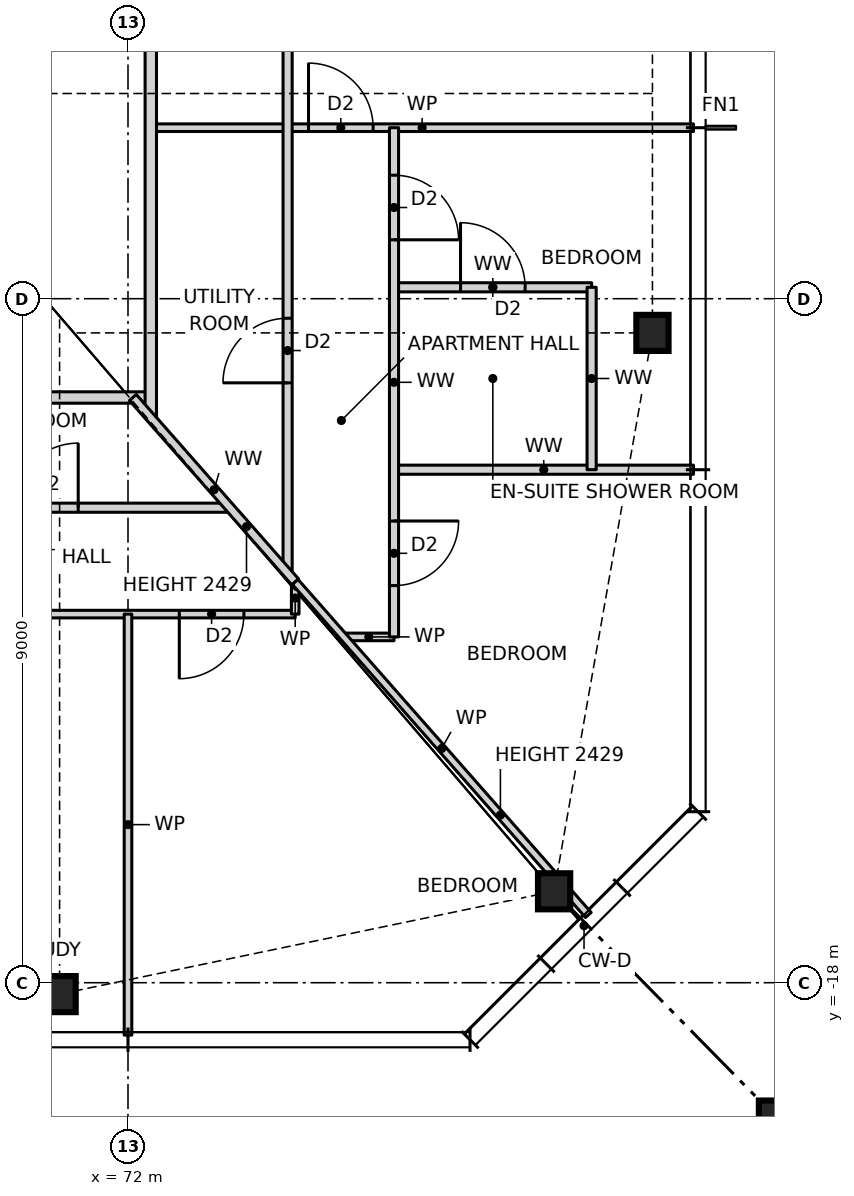
"""IFC4 building model, lengths in metres.
Left out: names, types, materials, properties, quantities, classifications, styles, units other than length and angle.
Written with IfcOpenShell. Run it as: python <this file> out.ifc"""

import sys

from ifc_helpers import new_model, si_unit, direction, frame, frame_2d, origin, origin_2d, place, context, subcontext, project, spatial, rectangle, hollow_rectangle, i_section, extrude, element, fill, save


model = new_model("IFC4")
c1 = context("Model", 3, precision=1e-05, world=origin(), true_north=direction((0.0, 1.0)))
c2 = subcontext(c1, "Body", "Model", "MODEL_VIEW")
j1 = project(units=[si_unit("LENGTHUNIT", "METRE"), si_unit("PLANEANGLEUNIT", "RADIAN")], contexts=[c1])
p1 = place(None, origin())
s1 = spatial("IfcSite", under=j1, at=p1, CompositionType="ELEMENT")
p2 = place(p1, origin())
s2 = spatial("IfcBuilding", under=s1, at=p2, CompositionType="ELEMENT")
p3 = place(p2, frame((0.0, 0.0, 29.0)))
s3 = spatial("IfcBuildingStorey", under=s2, at=p3, CompositionType="ELEMENT", Elevation=29.0)
for number, where, z_axis, x_axis in (
    (1, (71.1, -18.15, 0.0), (0.0, 0.0, 1.0), (1.0, 0.0, 0.0)),
    (2, (77.606, -16.797, 0.0), (0.0, 0.0, 1.0), (1.0, 0.0, 0.0)),
    (3, (78.9, -9.45, 0.0), (0.0, 0.0, 1.0), (1.0, 0.0, 0.0)),
):
    element("IfcColumn", number, at=place(p3, frame(where, z_axis=z_axis, x_axis=x_axis)), inside=s3, PredefinedType="COLUMN", context=c2, shape_type="SweptSolid", body=[
        extrude(i_section(OverallWidth=0.424, OverallDepth=0.475, WebThickness=0.048, FlangeThickness=0.077, at=origin_2d()), origin(), (0.0, 0.0, 1.0), 3.5),
    ])
p4 = place(p3, frame((80.9, -20.15, 0.0), z_axis=(0.0, 0.0, 1.0), x_axis=(1.0, 0.0, 0.0)))
e4 = element("IfcColumn", 4, at=p4, inside=s3, PredefinedType="COLUMN", context=c2, shape_type="SweptSolid", body=[
    extrude(hollow_rectangle(XDim=1.2, YDim=1.2, WallThickness=0.07, at=origin_2d()), origin(), (0.0, 0.0, 1.0), 3.5),
])
p5 = place(p3, frame((74.836, -13.45, 0.0), z_axis=(0.0, 0.0, 1.0), x_axis=(1.0, 0.0, 0.0)))
e5 = element("IfcWall", 5, at=p5, inside=s3, PredefinedType="PARTITIONING", context=c2, shape_type="SweptSolid", body=[
    extrude(rectangle(XDim=0.664, YDim=0.1, at=frame_2d((0.332, 0.0))), origin(), (0.0, 0.0, 1.0), 3.27),
])
p6 = place(p3, frame((63.0, -13.15, 0.0), z_axis=(0.0, 0.0, 1.0), x_axis=(1.0, 0.0, 0.0)))
e6 = element("IfcWall", 6, at=p6, inside=s3, PredefinedType="PARTITIONING", context=c2, shape_type="SweptSolid", body=[
    extrude(rectangle(XDim=11.2, YDim=0.1, at=frame_2d((5.6, 0.0))), origin(), (0.0, 0.0, 1.0), 3.27),
])
p7 = place(p6, frame((1.825, 0.0, 0.0)))
e7 = element("IfcOpeningElement", 7, at=p7, cuts=e6, PredefinedType="OPENING", context=c2, shape_type="SweptSolid", body=[
    extrude(rectangle(XDim=0.85, YDim=2.1, at=frame_2d((0.425, 1.05))), frame((0.0, 0.06, 0.0), z_axis=(0.0, -1.0, 0.0), x_axis=(1.0, 0.0, 0.0)), (0.0, 0.0, 1.0), 0.12),
])
p8 = place(p6, frame((6.325, 0.0, 0.0)))
e8 = element("IfcOpeningElement", 8, at=p8, cuts=e6, PredefinedType="OPENING", context=c2, shape_type="SweptSolid", body=[
    extrude(rectangle(XDim=0.85, YDim=2.1, at=frame_2d((0.425, 1.05))), frame((0.0, 0.06, 0.0), z_axis=(0.0, -1.0, 0.0), x_axis=(1.0, 0.0, 0.0)), (0.0, 0.0, 1.0), 0.12),
])
p9 = place(p6, frame((9.675, 0.0, 0.0)))
e9 = element("IfcOpeningElement", 9, at=p9, cuts=e6, PredefinedType="OPENING", context=c2, shape_type="SweptSolid", body=[
    extrude(rectangle(XDim=0.85, YDim=2.1, at=frame_2d((0.425, 1.05))), frame((0.0, 0.06, 0.0), z_axis=(0.0, -1.0, 0.0), x_axis=(1.0, 0.0, 0.0)), (0.0, 0.0, 1.0), 0.12),
])
p10 = place(p3, frame((54.0, -11.75, 0.0), z_axis=(0.0, 0.0, 1.0), x_axis=(1.0, 0.0, 0.0)))
e10 = element("IfcWall", 10, at=p10, inside=s3, PredefinedType="PARTITIONING", context=c2, shape_type="SweptSolid", body=[
    extrude(rectangle(XDim=19.34, YDim=0.12, at=frame_2d((9.67, 0.0))), origin(), (0.0, 0.0, 1.0), 3.27),
])
p11 = place(p10, frame((1.375, 0.0, 0.0)))
e11 = element("IfcOpeningElement", 11, at=p11, cuts=e10, PredefinedType="OPENING", context=c2, shape_type="SweptSolid", body=[
    extrude(rectangle(XDim=0.85, YDim=2.1, at=frame_2d((0.425, 1.05))), frame((0.0, 0.07, 0.0), z_axis=(0.0, -1.0, 0.0), x_axis=(1.0, 0.0, 0.0)), (0.0, 0.0, 1.0), 0.14),
])
p12 = place(p10, frame((4.575, 0.0, 0.0)))
e12 = element("IfcOpeningElement", 12, at=p12, cuts=e10, PredefinedType="OPENING", context=c2, shape_type="SweptSolid", body=[
    extrude(rectangle(XDim=0.85, YDim=2.1, at=frame_2d((0.425, 1.05))), frame((0.0, 0.07, 0.0), z_axis=(0.0, -1.0, 0.0), x_axis=(1.0, 0.0, 0.0)), (0.0, 0.0, 1.0), 0.14),
])
p13 = place(p10, frame((11.325, 0.0, 0.0)))
e13 = element("IfcOpeningElement", 13, at=p13, cuts=e10, PredefinedType="OPENING", context=c2, shape_type="SweptSolid", body=[
    extrude(rectangle(XDim=0.85, YDim=2.1, at=frame_2d((0.425, 1.05))), frame((0.0, 0.07, 0.0), z_axis=(0.0, -1.0, 0.0), x_axis=(1.0, 0.0, 0.0)), (0.0, 0.0, 1.0), 0.14),
])
p14 = place(p10, frame((16.495, 0.0, 0.0)))
e14 = element("IfcOpeningElement", 14, at=p14, cuts=e10, PredefinedType="OPENING", context=c2, shape_type="SweptSolid", body=[
    extrude(rectangle(XDim=0.85, YDim=2.1, at=frame_2d((0.425, 1.05))), frame((0.0, 0.07, 0.0), z_axis=(0.0, -1.0, 0.0), x_axis=(1.0, 0.0, 0.0)), (0.0, 0.0, 1.0), 0.14),
])
p15 = place(p3, frame((75.5, -11.25, 0.0), z_axis=(0.0, 0.0, 1.0), x_axis=(1.0, 0.0, 0.0)))
e15 = element("IfcWall", 15, at=p15, inside=s3, PredefinedType="PARTITIONING", context=c2, shape_type="SweptSolid", body=[
    extrude(rectangle(XDim=3.94, YDim=0.12, at=frame_2d((1.97, 0.0))), origin(), (0.0, 0.0, 1.0), 3.27),
])
p16 = place(p3, frame((53.7, -10.3, 0.0), z_axis=(0.0, 0.0, 1.0), x_axis=(1.0, 0.0, 0.0)))
e16 = element("IfcWall", 16, at=p16, inside=s3, PredefinedType="PARTITIONING", context=c2, shape_type="SweptSolid", body=[
    extrude(rectangle(XDim=18.6, YDim=0.15, at=frame_2d((9.3, 0.0))), origin(), (0.0, 0.0, 1.0), 3.27),
])
p17 = place(p16, frame((4.8, 0.0, 0.0)))
e17 = element("IfcOpeningElement", 17, at=p17, cuts=e16, PredefinedType="OPENING", context=c2, shape_type="SweptSolid", body=[
    extrude(rectangle(XDim=1.0, YDim=2.1, at=frame_2d((0.5, 1.05))), frame((0.0, 0.085, 0.0), z_axis=(0.0, -1.0, 0.0), x_axis=(1.0, 0.0, 0.0)), (0.0, 0.0, 1.0), 0.17),
])
p18 = place(p3, frame((75.5, -8.85, 0.0), z_axis=(0.0, 0.0, 1.0), x_axis=(1.0, 0.0, 0.0)))
e18 = element("IfcWall", 18, at=p18, inside=s3, PredefinedType="PARTITIONING", context=c2, shape_type="SweptSolid", body=[
    extrude(rectangle(XDim=2.6, YDim=0.12, at=frame_2d((1.3, 0.0))), origin(), (0.0, 0.0, 1.0), 3.27),
])
p19 = place(p18, frame((0.875, 0.0, 0.0)))
e19 = element("IfcOpeningElement", 19, at=p19, cuts=e18, PredefinedType="OPENING", context=c2, shape_type="SweptSolid", body=[
    extrude(rectangle(XDim=0.85, YDim=2.1, at=frame_2d((0.425, 1.05))), frame((0.0, 0.07, 0.0), z_axis=(0.0, -1.0, 0.0), x_axis=(1.0, 0.0, 0.0)), (0.0, 0.0, 1.0), 0.14),
])
p20 = place(p3, frame((72.3, -6.75, 0.0), z_axis=(0.0, 0.0, 1.0), x_axis=(1.0, 0.0, 0.0)))
e20 = element("IfcWall", 20, at=p20, inside=s3, PredefinedType="PARTITIONING", context=c2, shape_type="SweptSolid", body=[
    extrude(rectangle(XDim=7.14, YDim=0.1, at=frame_2d((3.57, 0.0))), origin(), (0.0, 0.0, 1.0), 3.27),
])
p21 = place(p20, frame((2.075, 0.0, 0.0)))
e21 = element("IfcOpeningElement", 21, at=p21, cuts=e20, PredefinedType="OPENING", context=c2, shape_type="SweptSolid", body=[
    extrude(rectangle(XDim=0.85, YDim=2.1, at=frame_2d((0.425, 1.05))), frame((0.0, 0.06, 0.0), z_axis=(0.0, -1.0, 0.0), x_axis=(1.0, 0.0, 0.0)), (0.0, 0.0, 1.0), 0.12),
])
p22 = place(p3, frame((78.1, -11.25, 0.0), z_axis=(0.0, 0.0, 1.0), x_axis=(0.0, 1.0, 0.0)))
e22 = element("IfcWall", 22, at=p22, inside=s3, PredefinedType="PARTITIONING", context=c2, shape_type="SweptSolid", body=[
    extrude(rectangle(XDim=2.4, YDim=0.12, at=frame_2d((1.2, 0.0))), origin(), (0.0, 0.0, 1.0), 3.27),
])
p23 = place(p3, frame((75.5, -13.45, 0.0), z_axis=(0.0, 0.0, 1.0), x_axis=(0.0, 1.0, 0.0)))
e23 = element("IfcWall", 23, at=p23, inside=s3, PredefinedType="PARTITIONING", context=c2, shape_type="SweptSolid", body=[
    extrude(rectangle(XDim=6.7, YDim=0.12, at=frame_2d((3.35, 0.0))), origin(), (0.0, 0.0, 1.0), 3.27),
])
p24 = place(p23, frame((5.225, 0.0, 0.0)))
e24 = element("IfcOpeningElement", 24, at=p24, cuts=e23, PredefinedType="OPENING", context=c2, shape_type="SweptSolid", body=[
    extrude(rectangle(XDim=0.85, YDim=2.1, at=frame_2d((0.425, 1.05))), frame((0.0, 0.07, 0.0), z_axis=(0.0, -1.0, 0.0), x_axis=(1.0, 0.0, 0.0)), (0.0, 0.0, 1.0), 0.14),
])
p25 = place(p23, frame((0.675, 0.0, 0.0)))
e25 = element("IfcOpeningElement", 25, at=p25, cuts=e23, PredefinedType="OPENING", context=c2, shape_type="SweptSolid", body=[
    extrude(rectangle(XDim=0.85, YDim=2.1, at=frame_2d((0.425, 1.05))), frame((0.0, 0.07, 0.0), z_axis=(0.0, -1.0, 0.0), x_axis=(1.0, 0.0, 0.0)), (0.0, 0.0, 1.0), 0.14),
])
p26 = place(p3, frame((74.2, -13.15, 0.0), z_axis=(0.0, 0.0, 1.0), x_axis=(0.0, 1.0, 0.0)))
e26 = element("IfcWall", 26, at=p26, inside=s3, PredefinedType="PARTITIONING", context=c2, shape_type="SweptSolid", body=[
    extrude(rectangle(XDim=0.423, YDim=0.1, at=frame_2d((0.211, 0.0))), origin(), (0.0, 0.0, 1.0), 3.27),
])
p27 = place(p3, frame((74.1, -12.614, 0.0), z_axis=(0.0, 0.0, 1.0), x_axis=(0.0, 1.0, 0.0)))
e27 = element("IfcWall", 27, at=p27, inside=s3, PredefinedType="PARTITIONING", context=c2, shape_type="SweptSolid", body=[
    extrude(rectangle(XDim=25.228, YDim=0.12, at=frame_2d((12.614, 0.0))), origin(), (0.0, 0.0, 1.0), 3.27),
])
p28 = place(p27, frame((7.239, 0.0, 0.0)))
e28 = element("IfcOpeningElement", 28, at=p28, cuts=e27, PredefinedType="OPENING", context=c2, shape_type="SweptSolid", body=[
    extrude(rectangle(XDim=0.85, YDim=2.1, at=frame_2d((0.425, 1.05))), frame((0.0, 0.07, 0.0), z_axis=(0.0, -1.0, 0.0), x_axis=(1.0, 0.0, 0.0)), (0.0, 0.0, 1.0), 0.14),
])
p29 = place(p27, frame((10.439, 0.0, 0.0)))
e29 = element("IfcOpeningElement", 29, at=p29, cuts=e27, PredefinedType="OPENING", context=c2, shape_type="SweptSolid", body=[
    extrude(rectangle(XDim=0.85, YDim=2.1, at=frame_2d((0.425, 1.05))), frame((0.0, 0.07, 0.0), z_axis=(0.0, -1.0, 0.0), x_axis=(1.0, 0.0, 0.0)), (0.0, 0.0, 1.0), 0.14),
])
p30 = place(p27, frame((2.507, 0.0, 0.0)))
e30 = element("IfcOpeningElement", 30, at=p30, cuts=e27, PredefinedType="OPENING", context=c2, shape_type="SweptSolid", body=[
    extrude(rectangle(XDim=0.85, YDim=2.1, at=frame_2d((0.425, 1.05))), frame((0.0, 0.07, 0.0), z_axis=(0.0, -1.0, 0.0), x_axis=(1.0, 0.0, 0.0)), (0.0, 0.0, 1.0), 0.14),
])
p31 = place(p27, frame((16.639, 0.0, 0.0)))
e31 = element("IfcOpeningElement", 31, at=p31, cuts=e27, PredefinedType="OPENING", context=c2, shape_type="SweptSolid", body=[
    extrude(rectangle(XDim=0.85, YDim=2.1, at=frame_2d((0.425, 1.05))), frame((0.0, 0.07, 0.0), z_axis=(0.0, -1.0, 0.0), x_axis=(1.0, 0.0, 0.0)), (0.0, 0.0, 1.0), 0.14),
])
p32 = place(p27, frame((21.821, 0.0, 0.0)))
e32 = element("IfcOpeningElement", 32, at=p32, cuts=e27, PredefinedType="OPENING", context=c2, shape_type="SweptSolid", body=[
    extrude(rectangle(XDim=0.85, YDim=2.1, at=frame_2d((0.425, 1.05))), frame((0.0, 0.07, 0.0), z_axis=(0.0, -1.0, 0.0), x_axis=(1.0, 0.0, 0.0)), (0.0, 0.0, 1.0), 0.14),
])
p33 = place(p3, frame((72.3, -10.568, 0.0), z_axis=(0.0, 0.0, 1.0), x_axis=(0.0, 1.0, 0.0)))
e33 = element("IfcWall", 33, at=p33, inside=s3, PredefinedType="PARTITIONING", context=c2, shape_type="SweptSolid", body=[
    extrude(rectangle(XDim=21.136, YDim=0.15, at=frame_2d((10.568, 0.0))), origin(), (0.0, 0.0, 1.0), 3.27),
])
p34 = place(p33, frame((8.318, 0.0, 0.0)))
e34 = element("IfcOpeningElement", 34, at=p34, cuts=e33, PredefinedType="OPENING", context=c2, shape_type="SweptSolid", body=[
    extrude(rectangle(XDim=1.0, YDim=2.1, at=frame_2d((0.5, 1.05))), frame((0.0, 0.085, 0.0), z_axis=(0.0, -1.0, 0.0), x_axis=(1.0, 0.0, 0.0)), (0.0, 0.0, 1.0), 0.17),
])
p35 = place(p3, frame((72.0, -18.69, 0.0), z_axis=(0.0, 0.0, 1.0), x_axis=(0.0, 1.0, 0.0)))
e35 = element("IfcWall", 35, at=p35, inside=s3, PredefinedType="PARTITIONING", context=c2, shape_type="SweptSolid", body=[
    extrude(rectangle(XDim=5.54, YDim=0.1, at=frame_2d((2.77, 0.0))), origin(), (0.0, 0.0, 1.0), 3.27),
])
p36 = place(p3, frame((74.2, -12.727, 0.0), z_axis=(0.0, 0.0, 1.0), x_axis=(-0.660667046586, 0.75067906162, 0.0)))
e36 = element("IfcWall", 36, at=p36, inside=s3, PredefinedType="PARTITIONING", context=c2, shape_type="SweptSolid", body=[
    extrude(rectangle(XDim=3.233, YDim=0.12, at=frame_2d((1.617, 0.0))), origin(), (0.0, 0.0, 1.0), 2.429),
])
p37 = place(p3, frame((78.057, -17.109, 0.0), z_axis=(0.0, 0.0, 1.0), x_axis=(-0.660698595885, 0.750651294141, 0.0)))
e37 = element("IfcWall", 37, at=p37, inside=s3, PredefinedType="PARTITIONING", context=c2, shape_type="SweptSolid", body=[
    extrude(rectangle(XDim=5.838, YDim=0.1, at=frame_2d((2.919, 0.0))), origin(), (0.0, 0.0, 1.0), 2.429),
])
p38 = place(p9, frame((0.85, 0.0, 0.0), z_axis=(0.0, 0.0, 1.0), x_axis=(-1.0, 0.0, 0.0)))
e38 = element("IfcDoor", 38, at=p38, inside=s3, OperationType="SINGLE_SWING_RIGHT", PredefinedType="DOOR", context=c2, shape_type="SweptSolid", body=[
    extrude(rectangle(XDim=0.85, YDim=2.1, at=frame_2d((0.425, 1.05))), frame((0.0, 0.025, 0.0), z_axis=(0.0, -1.0, 0.0), x_axis=(1.0, 0.0, 0.0)), (0.0, 0.0, 1.0), 0.05),
])
fill(e9, e38)
p39 = place(p14, origin())
e39 = element("IfcDoor", 39, at=p39, inside=s3, OperationType="SINGLE_SWING_RIGHT", PredefinedType="DOOR", context=c2, shape_type="SweptSolid", body=[
    extrude(rectangle(XDim=0.85, YDim=2.1, at=frame_2d((0.425, 1.05))), frame((0.0, 0.025, 0.0), z_axis=(0.0, -1.0, 0.0), x_axis=(1.0, 0.0, 0.0)), (0.0, 0.0, 1.0), 0.05),
])
fill(e14, e39)
p40 = place(p21, origin())
e40 = element("IfcDoor", 40, at=p40, inside=s3, OperationType="SINGLE_SWING_LEFT", PredefinedType="DOOR", context=c2, shape_type="SweptSolid", body=[
    extrude(rectangle(XDim=0.85, YDim=2.1, at=frame_2d((0.425, 1.05))), frame((0.0, 0.025, 0.0), z_axis=(0.0, -1.0, 0.0), x_axis=(1.0, 0.0, 0.0)), (0.0, 0.0, 1.0), 0.05),
])
fill(e21, e40)
p41 = place(p19, origin())
e41 = element("IfcDoor", 41, at=p41, inside=s3, OperationType="SINGLE_SWING_LEFT", PredefinedType="DOOR", context=c2, shape_type="SweptSolid", body=[
    extrude(rectangle(XDim=0.85, YDim=2.1, at=frame_2d((0.425, 1.05))), frame((0.0, 0.025, 0.0), z_axis=(0.0, -1.0, 0.0), x_axis=(1.0, 0.0, 0.0)), (0.0, 0.0, 1.0), 0.05),
])
fill(e19, e41)
p42 = place(p24, frame((0.85, 0.0, 0.0), z_axis=(0.0, 0.0, 1.0), x_axis=(-1.0, 0.0, 0.0)))
e42 = element("IfcDoor", 42, at=p42, inside=s3, OperationType="SINGLE_SWING_RIGHT", PredefinedType="DOOR", context=c2, shape_type="SweptSolid", body=[
    extrude(rectangle(XDim=0.85, YDim=2.1, at=frame_2d((0.425, 1.05))), frame((0.0, 0.025, 0.0), z_axis=(0.0, -1.0, 0.0), x_axis=(1.0, 0.0, 0.0)), (0.0, 0.0, 1.0), 0.05),
])
fill(e24, e42)
p43 = place(p25, frame((0.85, 0.0, 0.0), z_axis=(0.0, 0.0, 1.0), x_axis=(-1.0, 0.0, 0.0)))
e43 = element("IfcDoor", 43, at=p43, inside=s3, OperationType="SINGLE_SWING_LEFT", PredefinedType="DOOR", context=c2, shape_type="SweptSolid", body=[
    extrude(rectangle(XDim=0.85, YDim=2.1, at=frame_2d((0.425, 1.05))), frame((0.0, 0.025, 0.0), z_axis=(0.0, -1.0, 0.0), x_axis=(1.0, 0.0, 0.0)), (0.0, 0.0, 1.0), 0.05),
])
fill(e25, e43)
p44 = place(p30, origin())
e44 = element("IfcDoor", 44, at=p44, inside=s3, OperationType="SINGLE_SWING_LEFT", PredefinedType="DOOR", context=c2, shape_type="SweptSolid", body=[
    extrude(rectangle(XDim=0.85, YDim=2.1, at=frame_2d((0.425, 1.05))), frame((0.0, 0.025, 0.0), z_axis=(0.0, -1.0, 0.0), x_axis=(1.0, 0.0, 0.0)), (0.0, 0.0, 1.0), 0.05),
])
fill(e30, e44)
save(model, sys.argv[1])
